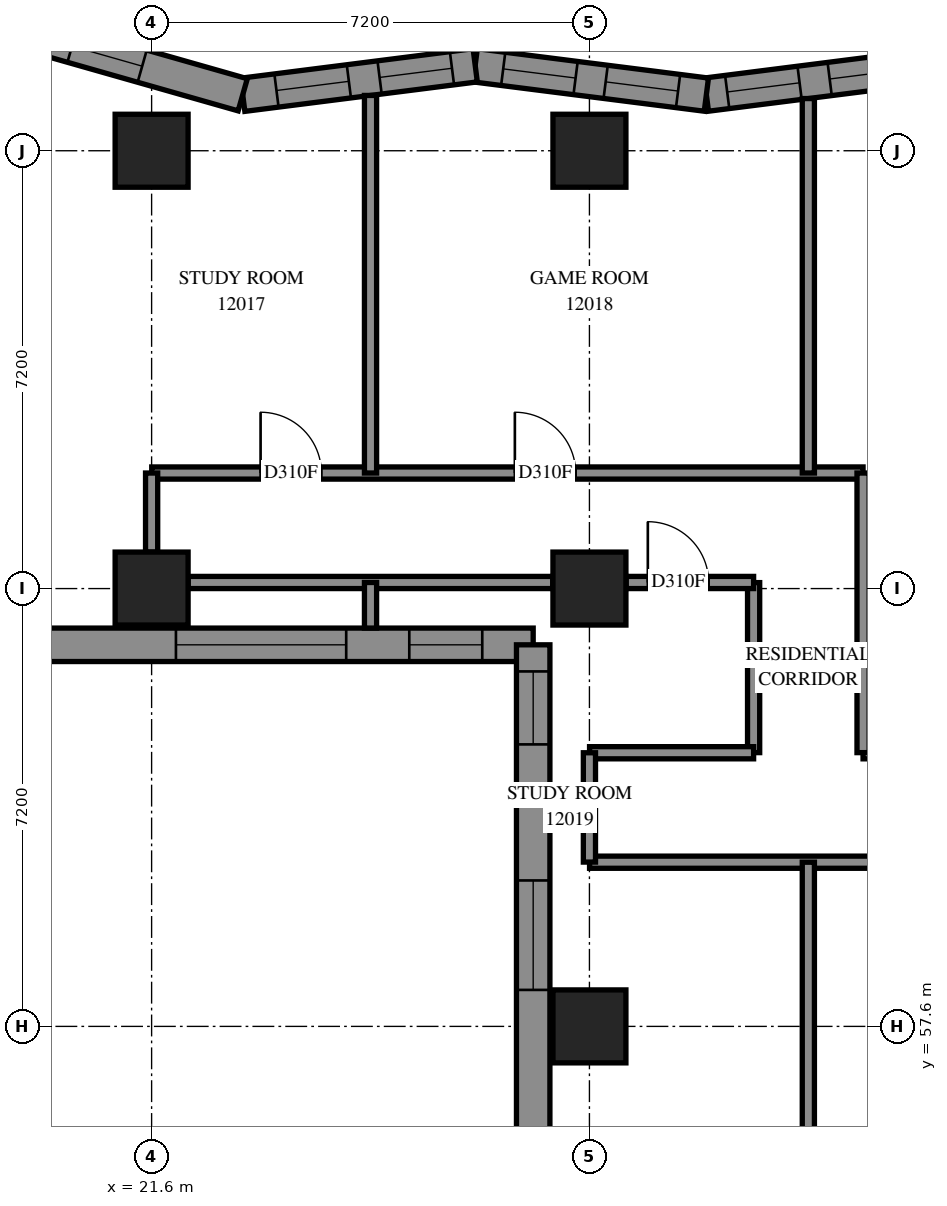
"""IFC4 building model, lengths in metres.
Left out: names, types, materials, properties, quantities, classifications, styles, units other than length and angle.
Written with IfcOpenShell. Run it as: python <this file> out.ifc"""

import sys

from ifc_helpers import new_model, si_unit, direction, frame, frame_2d, origin, origin_2d, place, context, subcontext, project, spatial, polyline, rectangle, outline, extrude, element, fill, save


model = new_model("IFC4")
c1 = context("Model", 3, precision=1e-05, world=origin(), true_north=direction((0.0, 1.0)))
c2 = subcontext(c1, "Body", "Model", "MODEL_VIEW")
j1 = project(units=[si_unit("LENGTHUNIT", "METRE"), si_unit("PLANEANGLEUNIT", "RADIAN")], contexts=[c1])
p1 = place(None, origin())
s1 = spatial("IfcSite", under=j1, at=p1, CompositionType="ELEMENT")
p2 = place(p1, origin())
s2 = spatial("IfcBuilding", under=s1, at=p2, CompositionType="ELEMENT")
p3 = place(p2, frame((0.0, 0.0, 47.4)))
s3 = spatial("IfcBuildingStorey", under=s2, at=p3, CompositionType="ELEMENT", Elevation=47.4)
for number, where, z_axis, x_axis in (
    (1, (21.6, 64.8, 0.0), (0.0, 0.0, 1.0), (1.0, 0.0, 0.0)),
    (2, (21.6, 72.0, 0.0), (0.0, 0.0, 1.0), (1.0, 0.0, 0.0)),
    (3, (28.8, 57.6, 0.0), (0.0, 0.0, 1.0), (1.0, 0.0, 0.0)),
    (4, (28.8, 64.8, 0.0), (0.0, 0.0, 1.0), (1.0, 0.0, 0.0)),
    (5, (28.8, 72.0, 0.0), (0.0, 0.0, 1.0), (1.0, 0.0, 0.0)),
):
    element("IfcColumn", number, at=place(p3, frame(where, z_axis=z_axis, x_axis=x_axis)), inside=s3, PredefinedType="COLUMN", context=c2, shape_type="SweptSolid", body=[
        extrude(rectangle(XDim=1.2, YDim=1.2, at=origin_2d()), origin(), (0.0, 0.0, 1.0), 3.1),
    ])
p4 = place(p3, frame((34.525, 73.405, 0.0), z_axis=(0.0, 0.0, 1.0), x_axis=(-0.9920583495, -0.1257785003, 0.0)))
e6 = element("IfcWall", 6, at=p4, inside=s3, PredefinedType="SOLIDWALL", context=c2, shape_type="SweptSolid", body=[
    extrude(outline(polyline([(-0.035, -0.275), (3.797, -0.275), (3.867, 0.275), (0.035, 0.275), (-0.035, -0.275)])), origin(), (0.0, 0.0, 1.0), 3.1),
])
p5 = place(p4, frame((0.588, 0.0, 0.5)))
e7 = element("IfcOpeningElement", 7, at=p5, cuts=e6, PredefinedType="OPENING", context=c2, shape_type="SweptSolid", body=[
    extrude(rectangle(XDim=1.2, YDim=2.45, at=frame_2d((0.6, 1.225))), frame((0.0, 0.285, 0.0), z_axis=(0.0, -1.0, 0.0), x_axis=(1.0, 0.0, 0.0)), (0.0, 0.0, 1.0), 0.57),
])
p6 = place(p4, frame((2.287, 0.0, 0.5)))
e8 = element("IfcOpeningElement", 8, at=p6, cuts=e6, PredefinedType="OPENING", context=c2, shape_type="SweptSolid", body=[
    extrude(rectangle(XDim=1.2, YDim=2.45, at=frame_2d((0.6, 1.225))), frame((0.0, 0.285, 0.0), z_axis=(0.0, -1.0, 0.0), x_axis=(1.0, 0.0, 0.0)), (0.0, 0.0, 1.0), 0.57),
])
p7 = place(p3, frame((30.723, 72.923, 0.0), z_axis=(0.0, 0.0, 1.0), x_axis=(-0.9920583495, 0.1257785003, 0.0)))
e9 = element("IfcWall", 9, at=p7, inside=s3, PredefinedType="SOLIDWALL", context=c2, shape_type="SweptSolid", body=[
    extrude(outline(polyline([(0.035, -0.275), (3.867, -0.275), (3.797, 0.275), (-0.035, 0.275), (0.035, -0.275)])), origin(), (0.0, 0.0, 1.0), 3.1),
])
p8 = place(p7, frame((0.469, 0.0, 0.5)))
e10 = element("IfcOpeningElement", 10, at=p8, cuts=e9, PredefinedType="OPENING", context=c2, shape_type="SweptSolid", body=[
    extrude(rectangle(XDim=1.2, YDim=2.45, at=frame_2d((0.6, 1.225))), frame((0.0, 0.285, 0.0), z_axis=(0.0, -1.0, 0.0), x_axis=(1.0, 0.0, 0.0)), (0.0, 0.0, 1.0), 0.57),
])
p9 = place(p7, frame((2.168, 0.0, 0.5)))
e11 = element("IfcOpeningElement", 11, at=p9, cuts=e9, PredefinedType="OPENING", context=c2, shape_type="SweptSolid", body=[
    extrude(rectangle(XDim=1.2, YDim=2.45, at=frame_2d((0.6, 1.225))), frame((0.0, 0.285, 0.0), z_axis=(0.0, -1.0, 0.0), x_axis=(1.0, 0.0, 0.0)), (0.0, 0.0, 1.0), 0.57),
])
p10 = place(p3, frame((26.921, 73.405, 0.0), z_axis=(0.0, 0.0, 1.0), x_axis=(-0.9920579561, -0.1257816033, 0.0)))
e12 = element("IfcWall", 12, at=p10, inside=s3, PredefinedType="SOLIDWALL", context=c2, shape_type="SweptSolid", body=[
    extrude(outline(polyline([(-0.035, -0.275), (3.797, -0.275), (3.91, 0.275), (0.035, 0.275), (-0.035, -0.275)])), origin(), (0.0, 0.0, 1.0), 3.1),
])
p11 = place(p10, frame((0.385, 0.0, 0.5)))
e13 = element("IfcOpeningElement", 13, at=p11, cuts=e12, PredefinedType="OPENING", context=c2, shape_type="SweptSolid", body=[
    extrude(rectangle(XDim=1.2, YDim=2.45, at=frame_2d((0.6, 1.225))), frame((0.0, 0.285, 0.0), z_axis=(0.0, -1.0, 0.0), x_axis=(1.0, 0.0, 0.0)), (0.0, 0.0, 1.0), 0.57),
])
p12 = place(p10, frame((2.094, 0.0, 0.5)))
e14 = element("IfcOpeningElement", 14, at=p12, cuts=e12, PredefinedType="OPENING", context=c2, shape_type="SweptSolid", body=[
    extrude(rectangle(XDim=1.2, YDim=2.45, at=frame_2d((0.6, 1.225))), frame((0.0, 0.285, 0.0), z_axis=(0.0, -1.0, 0.0), x_axis=(1.0, 0.0, 0.0)), (0.0, 0.0, 1.0), 0.57),
])
p13 = place(p3, frame((23.099, 72.92, 0.0), z_axis=(0.0, 0.0, 1.0), x_axis=(-0.9618040283, 0.2737389471, 0.0)))
e15 = element("IfcWall", 15, at=p13, inside=s3, PredefinedType="SOLIDWALL", context=c2, shape_type="SweptSolid", body=[
    extrude(outline(polyline([(0.056, -0.275), (4.009, -0.275), (3.28, 0.275), (-0.056, 0.275), (0.056, -0.275)])), origin(), (0.0, 0.0, 1.0), 3.1),
])
p14 = place(p13, frame((1.719, 0.0, 0.5)))
e16 = element("IfcOpeningElement", 16, at=p14, cuts=e15, PredefinedType="OPENING", context=c2, shape_type="SweptSolid", body=[
    extrude(rectangle(XDim=1.2, YDim=2.45, at=frame_2d((0.6, 1.225))), frame((0.0, 0.285, 0.0), z_axis=(0.0, -1.0, 0.0), x_axis=(1.0, 0.0, 0.0)), (0.0, 0.0, 1.0), 0.57),
])
p15 = place(p3, frame((19.593, 63.875, 0.0), z_axis=(0.0, 0.0, 1.0), x_axis=(1.0, 0.0, 0.0)))
e17 = element("IfcWall", 17, at=p15, inside=s3, PredefinedType="SOLIDWALL", context=c2, shape_type="SweptSolid", body=[
    extrude(outline(polyline([(-0.275, -0.275), (8.007, -0.275), (8.557, 0.275), (0.275, 0.275), (-0.275, -0.275)])), origin(), (0.0, 0.0, 1.0), 3.1),
])
p16 = place(p15, frame((2.407, 0.0, 0.5)))
e18 = element("IfcOpeningElement", 18, at=p16, cuts=e17, PredefinedType="OPENING", context=c2, shape_type="SweptSolid", body=[
    extrude(rectangle(XDim=2.8, YDim=2.45, at=frame_2d((1.4, 1.225))), frame((0.0, 0.285, 0.0), z_axis=(0.0, -1.0, 0.0), x_axis=(1.0, 0.0, 0.0)), (0.0, 0.0, 1.0), 0.57),
])
p17 = place(p15, frame((6.245, 0.0, 0.5)))
e19 = element("IfcOpeningElement", 19, at=p17, cuts=e17, PredefinedType="OPENING", context=c2, shape_type="SweptSolid", body=[
    extrude(rectangle(XDim=1.2, YDim=2.45, at=frame_2d((0.6, 1.225))), frame((0.0, 0.285, 0.0), z_axis=(0.0, -1.0, 0.0), x_axis=(1.0, 0.0, 0.0)), (0.0, 0.0, 1.0), 0.57),
])
p18 = place(p3, frame((27.875, 63.875, 0.0), z_axis=(0.0, 0.0, 1.0), x_axis=(0.0, -1.0, 0.0)))
e20 = element("IfcWall", 20, at=p18, inside=s3, PredefinedType="SOLIDWALL", context=c2, shape_type="SweptSolid", body=[
    extrude(outline(polyline([(0.275, -0.275), (8.557, -0.275), (8.007, 0.275), (-0.275, 0.275), (0.275, -0.275)])), origin(), (0.0, 0.0, 1.0), 3.1),
])
p19 = place(p18, frame((0.438, 0.0, 0.5)))
e21 = element("IfcOpeningElement", 21, at=p19, cuts=e20, PredefinedType="OPENING", context=c2, shape_type="SweptSolid", body=[
    extrude(rectangle(XDim=1.2, YDim=2.45, at=frame_2d((0.6, 1.225))), frame((0.0, 0.285, 0.0), z_axis=(0.0, -1.0, 0.0), x_axis=(1.0, 0.0, 0.0)), (0.0, 0.0, 1.0), 0.57),
])
p20 = place(p18, frame((3.875, 0.0, 0.7)))
e22 = element("IfcOpeningElement", 22, at=p20, cuts=e20, PredefinedType="OPENING", context=c2, shape_type="SweptSolid", body=[
    extrude(rectangle(XDim=1.8, YDim=2.2, at=frame_2d((0.9, 1.1))), frame((0.0, 0.285, 0.0), z_axis=(0.0, -1.0, 0.0), x_axis=(1.0, 0.0, 0.0)), (0.0, 0.0, 1.0), 0.57),
])
p21 = place(p3, frame((28.802, 60.3, 0.0), z_axis=(0.0, 0.0, 1.0), x_axis=(1.0, 0.0, 0.0)))
e23 = element("IfcWall", 23, at=p21, inside=s3, PredefinedType="PARTITIONING", context=c2, shape_type="SweptSolid", body=[
    extrude(rectangle(XDim=24.108, YDim=0.2, at=frame_2d((12.054, 0.0))), origin(), (0.0, 0.0, 1.0), 3.1),
])
p22 = place(p21, frame((11.323, 0.0, 0.0)))
e24 = element("IfcOpeningElement", 24, at=p22, cuts=e23, PredefinedType="OPENING", context=c2, shape_type="SweptSolid", body=[
    extrude(rectangle(XDim=1.0, YDim=2.1, at=frame_2d((0.5, 1.05))), frame((0.0, 0.11, 0.0), z_axis=(0.0, -1.0, 0.0), x_axis=(1.0, 0.0, 0.0)), (0.0, 0.0, 1.0), 0.22),
])
p23 = place(p21, frame((14.798, 0.0, 0.0)))
e25 = element("IfcOpeningElement", 25, at=p23, cuts=e23, PredefinedType="OPENING", context=c2, shape_type="SweptSolid", body=[
    extrude(rectangle(XDim=0.9, YDim=2.1, at=frame_2d((0.45, 1.05))), frame((0.0, 0.11, 0.0), z_axis=(0.0, -1.0, 0.0), x_axis=(1.0, 0.0, 0.0)), (0.0, 0.0, 1.0), 0.22),
])
p24 = place(p21, frame((18.833, 0.0, 0.0)))
e26 = element("IfcOpeningElement", 26, at=p24, cuts=e23, PredefinedType="OPENING", context=c2, shape_type="SweptSolid", body=[
    extrude(rectangle(XDim=1.0, YDim=2.1, at=frame_2d((0.5, 1.05))), frame((0.0, 0.11, 0.0), z_axis=(0.0, -1.0, 0.0), x_axis=(1.0, 0.0, 0.0)), (0.0, 0.0, 1.0), 0.22),
])
p25 = place(p21, frame((22.839, 0.0, 0.0)))
e27 = element("IfcOpeningElement", 27, at=p25, cuts=e23, PredefinedType="OPENING", context=c2, shape_type="SweptSolid", body=[
    extrude(rectangle(XDim=1.0, YDim=2.1, at=frame_2d((0.5, 1.05))), frame((0.0, 0.11, 0.0), z_axis=(0.0, -1.0, 0.0), x_axis=(1.0, 0.0, 0.0)), (0.0, 0.0, 1.0), 0.22),
])
p26 = place(p3, frame((33.3, 62.1, 0.0), z_axis=(0.0, 0.0, 1.0), x_axis=(1.0, 0.0, 0.0)))
e28 = element("IfcWall", 28, at=p26, inside=s3, PredefinedType="PARTITIONING", context=c2, shape_type="SweptSolid", body=[
    extrude(rectangle(XDim=21.2, YDim=0.2, at=frame_2d((10.6, 0.0))), origin(), (0.0, 0.0, 1.0), 3.1),
])
p27 = place(p26, frame((1.395, 0.0, 0.0)))
e29 = element("IfcOpeningElement", 29, at=p27, cuts=e28, PredefinedType="OPENING", context=c2, shape_type="SweptSolid", body=[
    extrude(rectangle(XDim=0.9, YDim=2.1, at=frame_2d((0.45, 1.05))), frame((0.0, 0.11, 0.0), z_axis=(0.0, -1.0, 0.0), x_axis=(1.0, 0.0, 0.0)), (0.0, 0.0, 1.0), 0.22),
])
p28 = place(p26, frame((8.674, 0.0, 0.0)))
e30 = element("IfcOpeningElement", 30, at=p28, cuts=e28, PredefinedType="OPENING", context=c2, shape_type="SweptSolid", body=[
    extrude(rectangle(XDim=1.0, YDim=2.1, at=frame_2d((0.5, 1.05))), frame((0.0, 0.11, 0.0), z_axis=(0.0, -1.0, 0.0), x_axis=(1.0, 0.0, 0.0)), (0.0, 0.0, 1.0), 0.22),
])
p29 = place(p26, frame((15.874, 0.0, 0.0)))
e31 = element("IfcOpeningElement", 31, at=p29, cuts=e28, PredefinedType="OPENING", context=c2, shape_type="SweptSolid", body=[
    extrude(rectangle(XDim=1.0, YDim=2.1, at=frame_2d((0.5, 1.05))), frame((0.0, 0.11, 0.0), z_axis=(0.0, -1.0, 0.0), x_axis=(1.0, 0.0, 0.0)), (0.0, 0.0, 1.0), 0.22),
])
p30 = place(p3, frame((21.602, 66.7, 0.0), z_axis=(0.0, 0.0, 1.0), x_axis=(1.0, 0.0, 0.0)))
e32 = element("IfcWall", 32, at=p30, inside=s3, PredefinedType="PARTITIONING", context=c2, shape_type="SweptSolid", body=[
    extrude(rectangle(XDim=11.698, YDim=0.2, at=frame_2d((5.849, 0.0))), origin(), (0.0, 0.0, 1.0), 3.1),
])
p31 = place(p30, frame((1.79, 0.0, 0.0)))
e33 = element("IfcOpeningElement", 33, at=p31, cuts=e32, PredefinedType="OPENING", context=c2, shape_type="SweptSolid", body=[
    extrude(rectangle(XDim=1.0, YDim=2.1, at=frame_2d((0.5, 1.05))), frame((0.0, 0.11, 0.0), z_axis=(0.0, -1.0, 0.0), x_axis=(1.0, 0.0, 0.0)), (0.0, 0.0, 1.0), 0.22),
])
p32 = place(p30, frame((5.972, 0.0, 0.0)))
e34 = element("IfcOpeningElement", 34, at=p32, cuts=e32, PredefinedType="OPENING", context=c2, shape_type="SweptSolid", body=[
    extrude(rectangle(XDim=1.0, YDim=2.1, at=frame_2d((0.5, 1.05))), frame((0.0, 0.11, 0.0), z_axis=(0.0, -1.0, 0.0), x_axis=(1.0, 0.0, 0.0)), (0.0, 0.0, 1.0), 0.22),
])
p33 = place(p3, frame((25.2, 66.7, 0.0), z_axis=(0.0, 0.0, 1.0), x_axis=(0.0, 1.0, 0.0)))
e35 = element("IfcWall", 35, at=p33, inside=s3, PredefinedType="PARTITIONING", context=c2, shape_type="SweptSolid", body=[
    extrude(rectangle(XDim=6.209, YDim=0.2, at=frame_2d((3.105, 0.0))), origin(), (0.0, 0.0, 1.0), 3.1),
])
p34 = place(p3, frame((32.4, 66.7, 0.0), z_axis=(0.0, 0.0, 1.0), x_axis=(0.0, 1.0, 0.0)))
e36 = element("IfcWall", 36, at=p34, inside=s3, PredefinedType="PARTITIONING", context=c2, shape_type="SweptSolid", body=[
    extrude(rectangle(XDim=6.158, YDim=0.2, at=frame_2d((3.079, 0.0))), origin(), (0.0, 0.0, 1.0), 3.1),
])
p35 = place(p3, frame((22.2, 64.9, 0.0), z_axis=(0.0, 0.0, 1.0), x_axis=(1.0, 0.0, 0.0)))
e37 = element("IfcWall", 37, at=p35, inside=s3, PredefinedType="PARTITIONING", context=c2, shape_type="SweptSolid", body=[
    extrude(rectangle(XDim=6.0, YDim=0.2, at=frame_2d((3.0, 0.0))), origin(), (0.0, 0.0, 1.0), 2.6),
])
p36 = place(p3, frame((33.3, 62.102, 0.0), z_axis=(0.0, 0.0, 1.0), x_axis=(0.0, 1.0, 0.0)))
e38 = element("IfcWall", 38, at=p36, inside=s3, PredefinedType="PARTITIONING", context=c2, shape_type="SweptSolid", body=[
    extrude(rectangle(XDim=4.598, YDim=0.2, at=frame_2d((2.299, 0.0))), origin(), (0.0, 0.0, 1.0), 3.1),
])
p37 = place(p3, frame((32.4, 55.868, 0.0), z_axis=(0.0, 0.0, 1.0), x_axis=(0.0, 1.0, 0.0)))
e39 = element("IfcWall", 39, at=p37, inside=s3, PredefinedType="PARTITIONING", context=c2, shape_type="SweptSolid", body=[
    extrude(rectangle(XDim=4.432, YDim=0.2, at=frame_2d((2.216, 0.0))), origin(), (0.0, 0.0, 1.0), 3.1),
])
p38 = place(p3, frame((31.5, 62.102, 0.0), z_axis=(0.0, 0.0, 1.0), x_axis=(0.0, 1.0, 0.0)))
e40 = element("IfcWall", 40, at=p38, inside=s3, PredefinedType="PARTITIONING", context=c2, shape_type="SweptSolid", body=[
    extrude(rectangle(XDim=2.796, YDim=0.2, at=frame_2d((1.398, 0.0))), origin(), (0.0, 0.0, 1.0), 3.1),
])
p39 = place(p3, frame((28.802, 62.1, 0.0), z_axis=(0.0, 0.0, 1.0), x_axis=(1.0, 0.0, 0.0)))
e41 = element("IfcWall", 41, at=p39, inside=s3, PredefinedType="PARTITIONING", context=c2, shape_type="SweptSolid", body=[
    extrude(rectangle(XDim=2.698, YDim=0.2, at=frame_2d((1.349, 0.0))), origin(), (0.0, 0.0, 1.0), 3.1),
])
p40 = place(p3, frame((29.4, 64.9, 0.0), z_axis=(0.0, 0.0, 1.0), x_axis=(1.0, 0.0, 0.0)))
e42 = element("IfcWall", 42, at=p40, inside=s3, PredefinedType="PARTITIONING", context=c2, shape_type="SweptSolid", body=[
    extrude(rectangle(XDim=2.1, YDim=0.2, at=frame_2d((1.05, 0.0))), origin(), (0.0, 0.0, 1.0), 3.1),
])
p41 = place(p40, frame((0.36, 0.0, 0.0)))
e43 = element("IfcOpeningElement", 43, at=p41, cuts=e42, PredefinedType="OPENING", context=c2, shape_type="SweptSolid", body=[
    extrude(rectangle(XDim=1.0, YDim=2.1, at=frame_2d((0.5, 1.05))), frame((0.0, 0.11, 0.0), z_axis=(0.0, -1.0, 0.0), x_axis=(1.0, 0.0, 0.0)), (0.0, 0.0, 1.0), 0.22),
])
p42 = place(p3, frame((28.8, 60.302, 0.0), z_axis=(0.0, 0.0, 1.0), x_axis=(0.0, 1.0, 0.0)))
e44 = element("IfcWall", 44, at=p42, inside=s3, PredefinedType="PARTITIONING", context=c2, shape_type="SweptSolid", body=[
    extrude(rectangle(XDim=1.798, YDim=0.2, at=frame_2d((0.899, 0.0))), origin(), (0.0, 0.0, 1.0), 2.6),
])
p43 = place(p3, frame((21.6, 65.4, 0.0), z_axis=(0.0, 0.0, 1.0), x_axis=(0.0, 1.0, 0.0)))
e45 = element("IfcWall", 45, at=p43, inside=s3, PredefinedType="PARTITIONING", context=c2, shape_type="SweptSolid", body=[
    extrude(rectangle(XDim=1.3, YDim=0.2, at=frame_2d((0.65, 0.0))), origin(), (0.0, 0.0, 1.0), 2.6),
])
p44 = place(p3, frame((25.2, 64.15, 0.0), z_axis=(0.0, 0.0, 1.0), x_axis=(0.0, 1.0, 0.0)))
e46 = element("IfcWall", 46, at=p44, inside=s3, PredefinedType="PARTITIONING", context=c2, shape_type="SweptSolid", body=[
    extrude(rectangle(XDim=0.75, YDim=0.2, at=frame_2d((0.375, 0.0))), origin(), (0.0, 0.0, 1.0), 3.1),
])
p45 = place(p3, frame((28.2, 64.9, 0.0), z_axis=(0.0, 0.0, 1.0), x_axis=(1.0, 0.0, 0.0)))
e47 = element("IfcWall", 47, at=p45, inside=s3, PredefinedType="PARTITIONING", context=c2, shape_type="SweptSolid", body=[
    extrude(rectangle(XDim=1.2, YDim=0.2, at=frame_2d((0.6, 0.0))), origin(), (0.0, 0.0, 1.0), 3.1),
])
p46 = place(p5, origin())
e48 = element("IfcWindow", 48, at=p46, inside=s3, PartitioningType="SINGLE_PANEL", PredefinedType="WINDOW", context=c2, shape_type="SweptSolid", body=[
    extrude(rectangle(XDim=1.2, YDim=2.45, at=frame_2d((0.6, 1.225))), frame((0.0, 0.155, 0.0), z_axis=(0.0, -1.0, 0.0), x_axis=(1.0, 0.0, 0.0)), (0.0, 0.0, 1.0), 0.06),
])
fill(e7, e48)
p47 = place(p6, origin())
e49 = element("IfcWindow", 49, at=p47, inside=s3, PartitioningType="SINGLE_PANEL", PredefinedType="WINDOW", context=c2, shape_type="SweptSolid", body=[
    extrude(rectangle(XDim=1.2, YDim=2.45, at=frame_2d((0.6, 1.225))), frame((0.0, 0.155, 0.0), z_axis=(0.0, -1.0, 0.0), x_axis=(1.0, 0.0, 0.0)), (0.0, 0.0, 1.0), 0.06),
])
fill(e8, e49)
p48 = place(p8, origin())
e50 = element("IfcWindow", 50, at=p48, inside=s3, PartitioningType="SINGLE_PANEL", PredefinedType="WINDOW", context=c2, shape_type="SweptSolid", body=[
    extrude(rectangle(XDim=1.2, YDim=2.45, at=frame_2d((0.6, 1.225))), frame((0.0, 0.155, 0.0), z_axis=(0.0, -1.0, 0.0), x_axis=(1.0, 0.0, 0.0)), (0.0, 0.0, 1.0), 0.06),
])
fill(e10, e50)
p49 = place(p9, origin())
e51 = element("IfcWindow", 51, at=p49, inside=s3, PartitioningType="SINGLE_PANEL", PredefinedType="WINDOW", context=c2, shape_type="SweptSolid", body=[
    extrude(rectangle(XDim=1.2, YDim=2.45, at=frame_2d((0.6, 1.225))), frame((0.0, 0.155, 0.0), z_axis=(0.0, -1.0, 0.0), x_axis=(1.0, 0.0, 0.0)), (0.0, 0.0, 1.0), 0.06),
])
fill(e11, e51)
p50 = place(p11, origin())
e52 = element("IfcWindow", 52, at=p50, inside=s3, PartitioningType="SINGLE_PANEL", PredefinedType="WINDOW", context=c2, shape_type="SweptSolid", body=[
    extrude(rectangle(XDim=1.2, YDim=2.45, at=frame_2d((0.6, 1.225))), frame((0.0, 0.155, 0.0), z_axis=(0.0, -1.0, 0.0), x_axis=(1.0, 0.0, 0.0)), (0.0, 0.0, 1.0), 0.06),
])
fill(e13, e52)
p51 = place(p12, origin())
e53 = element("IfcWindow", 53, at=p51, inside=s3, PartitioningType="SINGLE_PANEL", PredefinedType="WINDOW", context=c2, shape_type="SweptSolid", body=[
    extrude(rectangle(XDim=1.2, YDim=2.45, at=frame_2d((0.6, 1.225))), frame((0.0, 0.155, 0.0), z_axis=(0.0, -1.0, 0.0), x_axis=(1.0, 0.0, 0.0)), (0.0, 0.0, 1.0), 0.06),
])
fill(e14, e53)
p52 = place(p14, origin())
e54 = element("IfcWindow", 54, at=p52, inside=s3, PartitioningType="SINGLE_PANEL", PredefinedType="WINDOW", context=c2, shape_type="SweptSolid", body=[
    extrude(rectangle(XDim=1.2, YDim=2.45, at=frame_2d((0.6, 1.225))), frame((0.0, 0.155, 0.0), z_axis=(0.0, -1.0, 0.0), x_axis=(1.0, 0.0, 0.0)), (0.0, 0.0, 1.0), 0.06),
])
fill(e16, e54)
p53 = place(p16, origin())
e55 = element("IfcWindow", 55, at=p53, inside=s3, PartitioningType="SINGLE_PANEL", PredefinedType="WINDOW", context=c2, shape_type="SweptSolid", body=[
    extrude(rectangle(XDim=2.8, YDim=2.45, at=frame_2d((1.4, 1.225))), frame((0.0, 0.155, 0.0), z_axis=(0.0, -1.0, 0.0), x_axis=(1.0, 0.0, 0.0)), (0.0, 0.0, 1.0), 0.06),
])
fill(e18, e55)
p54 = place(p17, origin())
e56 = element("IfcWindow", 56, at=p54, inside=s3, PartitioningType="SINGLE_PANEL", PredefinedType="WINDOW", context=c2, shape_type="SweptSolid", body=[
    extrude(rectangle(XDim=1.2, YDim=2.45, at=frame_2d((0.6, 1.225))), frame((0.0, 0.155, 0.0), z_axis=(0.0, -1.0, 0.0), x_axis=(1.0, 0.0, 0.0)), (0.0, 0.0, 1.0), 0.06),
])
fill(e19, e56)
p55 = place(p19, origin())
e57 = element("IfcWindow", 57, at=p55, inside=s3, PartitioningType="SINGLE_PANEL", PredefinedType="WINDOW", context=c2, shape_type="SweptSolid", body=[
    extrude(rectangle(XDim=1.2, YDim=2.45, at=frame_2d((0.6, 1.225))), frame((0.0, 0.155, 0.0), z_axis=(0.0, -1.0, 0.0), x_axis=(1.0, 0.0, 0.0)), (0.0, 0.0, 1.0), 0.06),
])
fill(e21, e57)
p56 = place(p31, origin())
e58 = element("IfcDoor", 58, at=p56, inside=s3, OperationType="SINGLE_SWING_RIGHT", PredefinedType="DOOR", context=c2, shape_type="SweptSolid", body=[
    extrude(rectangle(XDim=1.0, YDim=2.1, at=frame_2d((0.5, 1.05))), frame((0.0, 0.025, 0.0), z_axis=(0.0, -1.0, 0.0), x_axis=(1.0, 0.0, 0.0)), (0.0, 0.0, 1.0), 0.05),
])
fill(e33, e58)
p57 = place(p32, origin())
e59 = element("IfcDoor", 59, at=p57, inside=s3, OperationType="SINGLE_SWING_LEFT", PredefinedType="DOOR", context=c2, shape_type="SweptSolid", body=[
    extrude(rectangle(XDim=1.0, YDim=2.1, at=frame_2d((0.5, 1.05))), frame((0.0, 0.025, 0.0), z_axis=(0.0, -1.0, 0.0), x_axis=(1.0, 0.0, 0.0)), (0.0, 0.0, 1.0), 0.05),
])
fill(e34, e59)
p58 = place(p41, origin())
e60 = element("IfcDoor", 60, at=p58, inside=s3, OperationType="SINGLE_SWING_RIGHT", PredefinedType="DOOR", context=c2, shape_type="SweptSolid", body=[
    extrude(rectangle(XDim=1.0, YDim=2.1, at=frame_2d((0.5, 1.05))), frame((0.0, 0.025, 0.0), z_axis=(0.0, -1.0, 0.0), x_axis=(1.0, 0.0, 0.0)), (0.0, 0.0, 1.0), 0.05),
])
fill(e43, e60)
p59 = place(p20, origin())
e61 = element("IfcWindow", 61, at=p59, inside=s3, PartitioningType="SINGLE_PANEL", PredefinedType="WINDOW", context=c2, shape_type="SweptSolid", body=[
    extrude(rectangle(XDim=1.8, YDim=2.2, at=frame_2d((0.9, 1.1))), frame((0.0, 0.155, 0.0), z_axis=(0.0, -1.0, 0.0), x_axis=(1.0, 0.0, 0.0)), (0.0, 0.0, 1.0), 0.06),
])
fill(e22, e61)
save(model, sys.argv[1])
